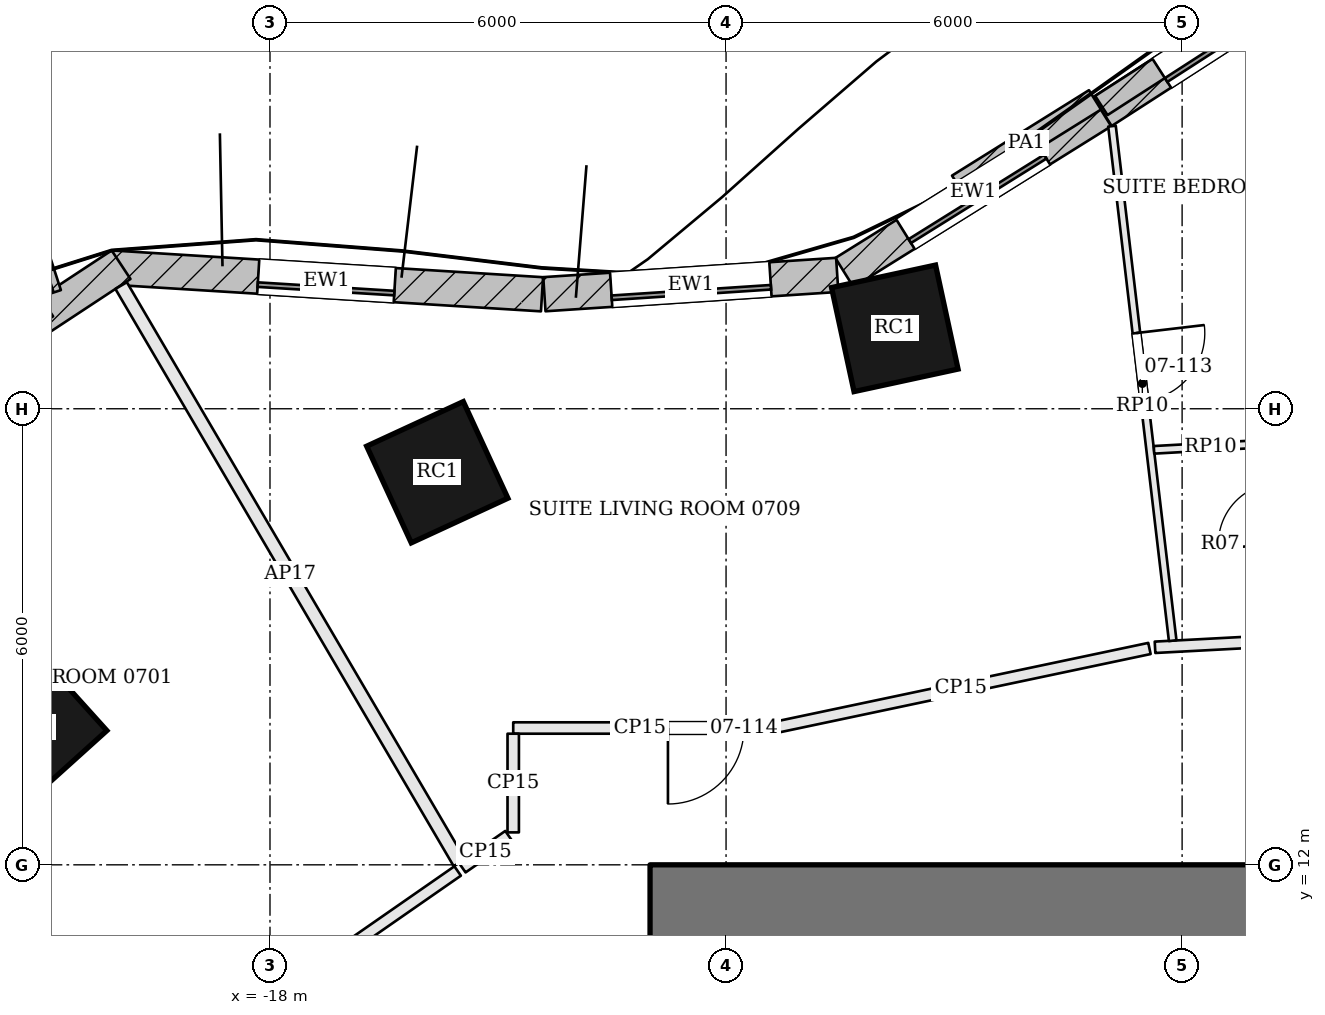
"""IFC4 building model, lengths in metres.
Left out: names, types, materials, properties, quantities, classifications, styles, units other than length and angle.
Written with IfcOpenShell. Run it as: python <this file> out.ifc"""

import sys

from ifc_helpers import new_model, si_unit, direction, frame, frame_2d, origin, origin_2d, place, context, subcontext, project, spatial, rectangle, extrude, element, fill, save


model = new_model("IFC4")
c1 = context("Model", 3, precision=1e-05, world=origin(), true_north=direction((0.0, 1.0)))
c2 = subcontext(c1, "Body", "Model", "MODEL_VIEW")
j1 = project(units=[si_unit("LENGTHUNIT", "METRE"), si_unit("PLANEANGLEUNIT", "RADIAN")], contexts=[c1])
p1 = place(None, origin())
s1 = spatial("IfcSite", under=j1, at=p1, CompositionType="ELEMENT")
p2 = place(p1, origin())
s2 = spatial("IfcBuilding", under=s1, at=p2, CompositionType="ELEMENT")
p3 = place(p2, frame((0.0, 0.0, 41.1)))
s3 = spatial("IfcBuildingStorey", under=s2, at=p3, CompositionType="ELEMENT", Elevation=41.1)
p4 = place(p3, frame((-13.0, 11.3, 0.0), z_axis=(0.0, 0.0, 1.0), x_axis=(1.0, 0.0, 0.0)))
e1 = element("IfcWall", 1, at=p4, inside=s3, PredefinedType="SHEAR", context=c2, shape_type="SweptSolid", body=[
    extrude(rectangle(XDim=26.0, YDim=1.4, at=frame_2d((13.0, 0.0))), origin(), (0.0, 0.0, 1.0), 3.6),
])
p5 = place(p4, frame((8.825, 0.0, 0.0)))
e2 = element("IfcOpeningElement", 2, at=p5, cuts=e1, PredefinedType="OPENING", context=c2, shape_type="SweptSolid", body=[
    extrude(rectangle(XDim=1.0, YDim=2.1, at=frame_2d((0.5, 1.05))), frame((0.0, 0.71, 0.0), z_axis=(0.0, -1.0, 0.0), x_axis=(1.0, 0.0, 0.0)), (0.0, 0.0, 1.0), 1.42),
])
p6 = place(p4, frame((11.275, 0.0, 0.0)))
e3 = element("IfcOpeningElement", 3, at=p6, cuts=e1, PredefinedType="OPENING", context=c2, shape_type="SweptSolid", body=[
    extrude(rectangle(XDim=1.0, YDim=2.1, at=frame_2d((0.5, 1.05))), frame((0.0, 0.71, 0.0), z_axis=(0.0, -1.0, 0.0), x_axis=(1.0, 0.0, 0.0)), (0.0, 0.0, 1.0), 1.42),
])
p7 = place(p4, frame((14.125, 0.0, 0.0)))
e4 = element("IfcOpeningElement", 4, at=p7, cuts=e1, PredefinedType="OPENING", context=c2, shape_type="SweptSolid", body=[
    extrude(rectangle(XDim=1.0, YDim=2.1, at=frame_2d((0.5, 1.05))), frame((0.0, 0.71, 0.0), z_axis=(0.0, -1.0, 0.0), x_axis=(1.0, 0.0, 0.0)), (0.0, 0.0, 1.0), 1.42),
])
p8 = place(p4, frame((16.725, 0.0, 0.0)))
e5 = element("IfcOpeningElement", 5, at=p8, cuts=e1, PredefinedType="OPENING", context=c2, shape_type="SweptSolid", body=[
    extrude(rectangle(XDim=0.7, YDim=2.1, at=frame_2d((0.35, 1.05))), frame((0.0, 0.71, 0.0), z_axis=(0.0, -1.0, 0.0), x_axis=(1.0, 0.0, 0.0)), (0.0, 0.0, 1.0), 1.42),
])
for number, where, z_axis, x_axis in (
    (6, (-9.78, 19.058, 0.0), (0.0, 0.0, 1.0), (-0.977, -0.211, 0.0)),
    (7, (-15.799, 17.165, 0.0), (0.0, 0.0, 1.0), (-0.908, -0.419, 0.0)),
    (8, (-21.135, 13.817, 0.0), (0.0, 0.0, 1.0), (-0.743, -0.67, 0.0)),
):
    element("IfcColumn", number, at=place(p3, frame(where, z_axis=z_axis, x_axis=x_axis)), inside=s3, PredefinedType="COLUMN", context=c2, shape_type="SweptSolid", body=[
        extrude(rectangle(XDim=1.4, YDim=1.4, at=origin_2d()), origin(), (0.0, 0.0, 1.0), 3.6),
    ])
p9 = place(p3, frame((-3.721, 24.055, 0.0), z_axis=(0.0, 0.0, 1.0), x_axis=(-0.840404438766, -0.54195975801, 0.0)))
e9 = element("IfcWall", 9, at=p9, inside=s3, PredefinedType="SOLIDWALL", context=c2, shape_type="SweptSolid", body=[
    extrude(rectangle(XDim=3.96, YDim=0.45, at=frame_2d((1.98, 0.0))), origin(), (0.0, 0.0, 1.0), 3.4),
])
p10 = place(p9, frame((0.93, 0.0, 0.9)))
e10 = element("IfcOpeningElement", 10, at=p10, cuts=e9, PredefinedType="OPENING", context=c2, shape_type="SweptSolid", body=[
    extrude(rectangle(XDim=2.1, YDim=2.0, at=frame_2d((1.05, 1.0))), frame((0.0, 0.235, 0.0), z_axis=(0.0, -1.0, 0.0), x_axis=(1.0, 0.0, 0.0)), (0.0, 0.0, 1.0), 0.47),
])
p11 = place(p3, frame((-7.052, 21.907, 0.0), z_axis=(0.0, 0.0, 1.0), x_axis=(-0.848498976054, -0.529197021566, 0.0)))
e11 = element("IfcWall", 11, at=p11, inside=s3, PredefinedType="SOLIDWALL", context=c2, shape_type="SweptSolid", body=[
    extrude(rectangle(XDim=3.997, YDim=0.45, at=frame_2d((1.998, 0.0))), origin(), (0.0, 0.0, 1.0), 3.4),
])
p12 = place(p11, frame((0.948, 0.0, 0.9)))
e12 = element("IfcOpeningElement", 12, at=p12, cuts=e11, PredefinedType="OPENING", context=c2, shape_type="SweptSolid", body=[
    extrude(rectangle(XDim=2.1, YDim=2.0, at=frame_2d((1.05, 1.0))), frame((0.0, 0.235, 0.0), z_axis=(0.0, -1.0, 0.0), x_axis=(1.0, 0.0, 0.0)), (0.0, 0.0, 1.0), 0.47),
])
p13 = place(p3, frame((-10.537, 19.761, 0.0), z_axis=(0.0, 0.0, 1.0), x_axis=(-0.997831357874, -0.065822346084, 0.0)))
e13 = element("IfcWall", 13, at=p13, inside=s3, PredefinedType="SOLIDWALL", context=c2, shape_type="SweptSolid", body=[
    extrude(rectangle(XDim=3.861, YDim=0.45, at=frame_2d((1.931, 0.0))), origin(), (0.0, 0.0, 1.0), 3.4),
])
p14 = place(p13, frame((0.881, 0.0, 0.9)))
e14 = element("IfcOpeningElement", 14, at=p14, cuts=e13, PredefinedType="OPENING", context=c2, shape_type="SweptSolid", body=[
    extrude(rectangle(XDim=2.1, YDim=2.0, at=frame_2d((1.05, 1.0))), frame((0.0, 0.235, 0.0), z_axis=(0.0, -1.0, 0.0), x_axis=(1.0, 0.0, 0.0)), (0.0, 0.0, 1.0), 0.47),
])
p15 = place(p3, frame((-14.421, 19.506, 0.0), z_axis=(0.0, 0.0, 1.0), x_axis=(-0.998078573447, 0.06196096534, 0.0)))
e15 = element("IfcWall", 15, at=p15, inside=s3, PredefinedType="SOLIDWALL", context=c2, shape_type="SweptSolid", body=[
    extrude(rectangle(XDim=5.682, YDim=0.45, at=frame_2d((2.841, 0.0))), origin(), (0.0, 0.0, 1.0), 3.4),
])
p16 = place(p15, frame((1.941, 0.0, 0.9)))
e16 = element("IfcOpeningElement", 16, at=p16, cuts=e15, PredefinedType="OPENING", context=c2, shape_type="SweptSolid", body=[
    extrude(rectangle(XDim=1.8, YDim=2.0, at=frame_2d((0.9, 1.0))), frame((0.0, 0.235, 0.0), z_axis=(0.0, -1.0, 0.0), x_axis=(1.0, 0.0, 0.0)), (0.0, 0.0, 1.0), 0.47),
])
p17 = place(p3, frame((-19.959, 19.895, 0.0), z_axis=(0.0, 0.0, 1.0), x_axis=(-0.835201398752, -0.549944200372, 0.0)))
e17 = element("IfcWall", 17, at=p17, inside=s3, PredefinedType="SOLIDWALL", context=c2, shape_type="SweptSolid", body=[
    extrude(rectangle(XDim=4.748, YDim=0.45, at=frame_2d((2.374, 0.0))), origin(), (0.0, 0.0, 1.0), 3.4),
])
p18 = place(p17, frame((1.324, 0.0, 0.9)))
e18 = element("IfcOpeningElement", 18, at=p18, cuts=e17, PredefinedType="OPENING", context=c2, shape_type="SweptSolid", body=[
    extrude(rectangle(XDim=2.1, YDim=2.0, at=frame_2d((1.05, 1.0))), frame((0.0, 0.235, 0.0), z_axis=(0.0, -1.0, 0.0), x_axis=(1.0, 0.0, 0.0)), (0.0, 0.0, 1.0), 0.47),
])
p19 = place(p3, frame((-20.846, 19.53, 0.0), z_axis=(0.0, 0.0, 1.0), x_axis=(-0.309732726603, 0.950823662974, 0.0)))
e19 = element("IfcWall", 19, at=p19, inside=s3, PredefinedType="SOLIDWALL", context=c2, shape_type="SweptSolid", body=[
    extrude(rectangle(XDim=1.75, YDim=0.2, at=frame_2d((0.875, 0.0))), origin(), (0.0, 0.0, 1.0), 3.4),
])
p20 = place(p3, frame((-3.839, 24.068, 3.6), z_axis=(0.0, 0.0, 1.0), x_axis=(-0.84044157539, -0.541902166776, 0.0)))
e20 = element("IfcWall", 20, at=p20, inside=s3, PredefinedType="PARAPET", context=c2, shape_type="SweptSolid", body=[
    extrude(rectangle(XDim=3.836, YDim=0.3, at=frame_2d((1.918, 0.0))), origin(), (0.0, 0.0, 1.0), 1.1),
])
p21 = place(p3, frame((-7.146, 22.064, 3.6), z_axis=(0.0, 0.0, 1.0), x_axis=(-0.848488829337, -0.529213290168, 0.0)))
e21 = element("IfcWall", 21, at=p21, inside=s3, PredefinedType="PARAPET", context=c2, shape_type="SweptSolid", body=[
    extrude(rectangle(XDim=2.124, YDim=0.3, at=frame_2d((1.062, 0.0))), origin(), (0.0, 0.0, 1.0), 1.1),
])
p22 = place(p3, frame((-20.936, 19.342, 3.6), z_axis=(0.0, 0.0, 1.0), x_axis=(-0.835169297141, -0.549992950057, 0.0)))
e22 = element("IfcWall", 22, at=p22, inside=s3, PredefinedType="PARAPET", context=c2, shape_type="SweptSolid", body=[
    extrude(rectangle(XDim=3.49, YDim=0.3, at=frame_2d((1.745, 0.0))), origin(), (0.0, 0.0, 1.0), 1.1),
])
p23 = place(p3, frame((-3.31, 15.024, 0.0), z_axis=(0.0, 0.0, 1.0), x_axis=(-0.998591396637, -0.053058670938, 0.0)))
e23 = element("IfcWall", 23, at=p23, inside=s3, PredefinedType="PARTITIONING", context=c2, shape_type="SweptSolid", body=[
    extrude(rectangle(XDim=3.051, YDim=0.15, at=frame_2d((1.525, 0.0))), origin(), (0.0, 0.0, 1.0), 2.68),
])
p24 = place(p3, frame((-6.43, 14.846, 0.0), z_axis=(0.0, 0.0, 1.0), x_axis=(-0.978470502428, -0.206386714394, 0.0)))
e24 = element("IfcWall", 24, at=p24, inside=s3, PredefinedType="PARTITIONING", context=c2, shape_type="SweptSolid", body=[
    extrude(rectangle(XDim=5.069, YDim=0.15, at=frame_2d((2.534, 0.0))), origin(), (0.0, 0.0, 1.0), 2.68),
])
p25 = place(p3, frame((-11.464, 13.8, 0.0), z_axis=(0.0, 0.0, 1.0), x_axis=(-1.0, 0.0, 0.0)))
e25 = element("IfcWall", 25, at=p25, inside=s3, PredefinedType="PARTITIONING", context=c2, shape_type="SweptSolid", body=[
    extrude(rectangle(XDim=3.336, YDim=0.15, at=frame_2d((1.668, 0.0))), origin(), (0.0, 0.0, 1.0), 2.68),
])
p26 = place(p25, frame((0.3, 0.0, 0.0)))
e26 = element("IfcOpeningElement", 26, at=p26, cuts=e25, PredefinedType="OPENING", context=c2, shape_type="SweptSolid", body=[
    extrude(rectangle(XDim=1.0, YDim=2.1, at=frame_2d((0.5, 1.05))), frame((0.0, 0.085, 0.0), z_axis=(0.0, -1.0, 0.0), x_axis=(1.0, 0.0, 0.0)), (0.0, 0.0, 1.0), 0.17),
])
p27 = place(p3, frame((-14.8, 13.725, 0.0), z_axis=(0.0, 0.0, 1.0), x_axis=(-0.000188040613, -0.99999998232, 0.0)))
e27 = element("IfcWall", 27, at=p27, inside=s3, PredefinedType="PARTITIONING", context=c2, shape_type="SweptSolid", body=[
    extrude(rectangle(XDim=1.298, YDim=0.15, at=frame_2d((0.649, 0.0))), origin(), (0.0, 0.0, 1.0), 2.68),
])
p28 = place(p3, frame((-14.862, 12.384, 0.0), z_axis=(0.0, 0.0, 1.0), x_axis=(-0.821086629872, -0.570803596911, 0.0)))
e28 = element("IfcWall", 28, at=p28, inside=s3, PredefinedType="PARTITIONING", context=c2, shape_type="SweptSolid", body=[
    extrude(rectangle(XDim=0.74, YDim=0.15, at=frame_2d((0.37, 0.0))), origin(), (0.0, 0.0, 1.0), 2.68),
])
p29 = place(p3, frame((-19.958, 19.62, 0.0), z_axis=(0.0, 0.0, 1.0), x_axis=(0.505625538269, -0.862753044069, 0.0)))
e29 = element("IfcWall", 29, at=p29, inside=s3, PredefinedType="PARTITIONING", context=c2, shape_type="SweptSolid", body=[
    extrude(rectangle(XDim=8.802, YDim=0.175, at=frame_2d((4.401, 0.0))), origin(), (0.0, 0.0, 1.0), 2.68),
])
p30 = place(p3, frame((-15.531, 11.919, 0.0), z_axis=(0.0, 0.0, 1.0), x_axis=(-0.821142304153, -0.570723502522, 0.0)))
e30 = element("IfcWall", 30, at=p30, inside=s3, PredefinedType="PARTITIONING", context=c2, shape_type="SweptSolid", body=[
    extrude(rectangle(XDim=3.588, YDim=0.15, at=frame_2d((1.794, 0.0))), origin(), (0.0, 0.0, 1.0), 2.68),
])
p31 = place(p30, frame((2.13, 0.0, 0.0)))
e31 = element("IfcOpeningElement", 31, at=p31, cuts=e30, PredefinedType="OPENING", context=c2, shape_type="SweptSolid", body=[
    extrude(rectangle(XDim=1.0, YDim=2.4, at=frame_2d((0.5, 1.2))), frame((0.0, 0.085, 0.0), z_axis=(0.0, -1.0, 0.0), x_axis=(1.0, 0.0, 0.0)), (0.0, 0.0, 1.0), 0.17),
])
p32 = place(p3, frame((-24.996, 12.871, 0.0), z_axis=(0.0, 0.0, 1.0), x_axis=(0.779371961482, -0.626561525835, 0.0)))
e32 = element("IfcWall", 32, at=p32, inside=s3, PredefinedType="PARTITIONING", context=c2, shape_type="SweptSolid", body=[
    extrude(rectangle(XDim=6.932, YDim=0.175, at=frame_2d((3.466, 0.0))), origin(), (0.0, 0.0, 1.0), 2.68),
])
p33 = place(p3, frame((-6.923, 21.718, 0.0), z_axis=(0.0, 0.0, 1.0), x_axis=(0.117163366321, -0.993112655036, 0.0)))
e33 = element("IfcWall", 33, at=p33, inside=s3, PredefinedType="PARTITIONING", context=c2, shape_type="SweptSolid", body=[
    extrude(rectangle(XDim=6.816, YDim=0.1, at=frame_2d((3.408, 0.0))), origin(), (0.0, 0.0, 1.0), 2.68),
])
p34 = place(p33, frame((2.741, 0.0, 0.0)))
e34 = element("IfcOpeningElement", 34, at=p34, cuts=e33, PredefinedType="OPENING", context=c2, shape_type="SweptSolid", body=[
    extrude(rectangle(XDim=0.9, YDim=2.4, at=frame_2d((0.45, 1.2))), frame((0.0, 0.06, 0.0), z_axis=(0.0, -1.0, 0.0), x_axis=(1.0, 0.0, 0.0)), (0.0, 0.0, 1.0), 0.12),
])
p35 = place(p3, frame((-4.882, 17.542, 0.0), z_axis=(0.0, 0.0, 1.0), x_axis=(-0.998448742198, -0.055678624298, 0.0)))
e35 = element("IfcWall", 35, at=p35, inside=s3, PredefinedType="PARTITIONING", context=c2, shape_type="SweptSolid", body=[
    extrude(rectangle(XDim=1.491, YDim=0.1, at=frame_2d((0.745, 0.0))), origin(), (0.0, 0.0, 1.0), 2.68),
])
p36 = place(p10, origin())
e36 = element("IfcWindow", 36, at=p36, inside=s3, PartitioningType="SINGLE_PANEL", PredefinedType="WINDOW", context=c2, shape_type="SweptSolid", body=[
    extrude(rectangle(XDim=2.1, YDim=2.0, at=frame_2d((1.05, 1.0))), frame((0.0, 0.135, 0.0), z_axis=(0.0, -1.0, 0.0), x_axis=(1.0, 0.0, 0.0)), (0.0, 0.0, 1.0), 0.06),
])
fill(e10, e36)
p37 = place(p12, origin())
e37 = element("IfcWindow", 37, at=p37, inside=s3, PartitioningType="SINGLE_PANEL", PredefinedType="WINDOW", context=c2, shape_type="SweptSolid", body=[
    extrude(rectangle(XDim=2.1, YDim=2.0, at=frame_2d((1.05, 1.0))), frame((0.0, 0.135, 0.0), z_axis=(0.0, -1.0, 0.0), x_axis=(1.0, 0.0, 0.0)), (0.0, 0.0, 1.0), 0.06),
])
fill(e12, e37)
p38 = place(p14, origin())
e38 = element("IfcWindow", 38, at=p38, inside=s3, PartitioningType="SINGLE_PANEL", PredefinedType="WINDOW", context=c2, shape_type="SweptSolid", body=[
    extrude(rectangle(XDim=2.1, YDim=2.0, at=frame_2d((1.05, 1.0))), frame((0.0, 0.135, 0.0), z_axis=(0.0, -1.0, 0.0), x_axis=(1.0, 0.0, 0.0)), (0.0, 0.0, 1.0), 0.06),
])
fill(e14, e38)
p39 = place(p16, origin())
e39 = element("IfcWindow", 39, at=p39, inside=s3, PartitioningType="SINGLE_PANEL", PredefinedType="WINDOW", context=c2, shape_type="SweptSolid", body=[
    extrude(rectangle(XDim=1.8, YDim=2.0, at=frame_2d((0.9, 1.0))), frame((0.0, 0.135, 0.0), z_axis=(0.0, -1.0, 0.0), x_axis=(1.0, 0.0, 0.0)), (0.0, 0.0, 1.0), 0.06),
])
fill(e16, e39)
p40 = place(p34, origin())
e40 = element("IfcDoor", 40, at=p40, inside=s3, OperationType="SINGLE_SWING_LEFT", PredefinedType="DOOR", context=c2, shape_type="SweptSolid", body=[
    extrude(rectangle(XDim=0.9, YDim=2.4, at=frame_2d((0.45, 1.2))), frame((0.0, 0.025, 0.0), z_axis=(0.0, -1.0, 0.0), x_axis=(1.0, 0.0, 0.0)), (0.0, 0.0, 1.0), 0.05),
])
fill(e34, e40)
p41 = place(p26, origin())
e41 = element("IfcDoor", 41, at=p41, inside=s3, OperationType="SINGLE_SWING_RIGHT", PredefinedType="DOOR", context=c2, shape_type="SweptSolid", body=[
    extrude(rectangle(XDim=1.0, YDim=2.1, at=frame_2d((0.5, 1.05))), frame((0.0, 0.025, 0.0), z_axis=(0.0, -1.0, 0.0), x_axis=(1.0, 0.0, 0.0)), (0.0, 0.0, 1.0), 0.05),
])
fill(e26, e41)
save(model, sys.argv[1])
